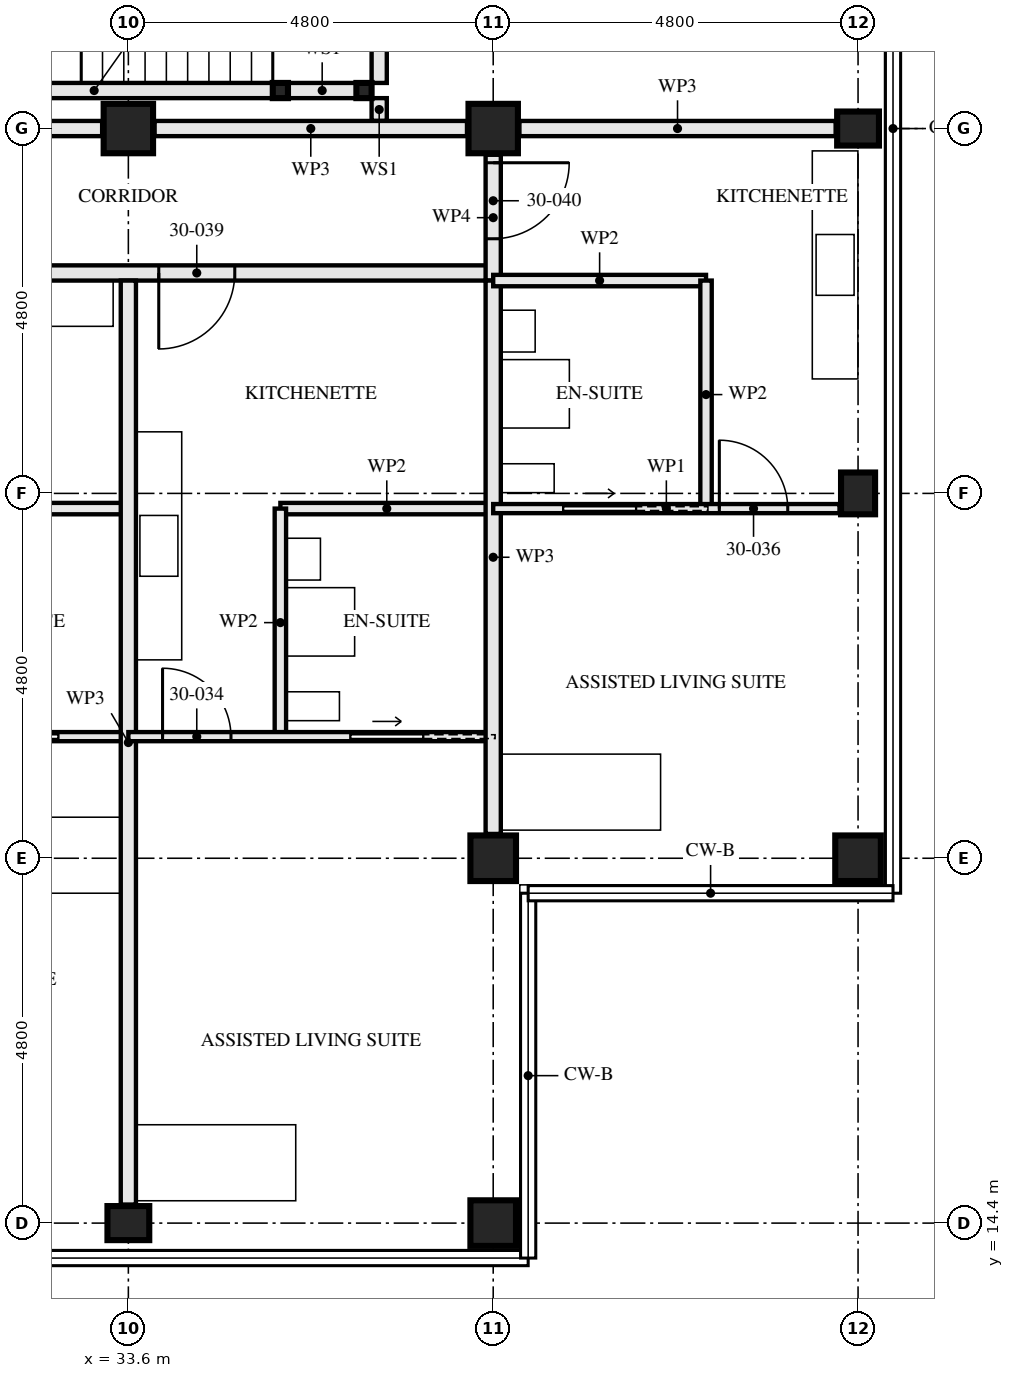
"""IFC4 building model, lengths in metres.
Left out: names, types, materials, properties, quantities, classifications, styles, units other than length and angle.
Written with IfcOpenShell. Run it as: python <this file> out.ifc"""

import sys

from ifc_helpers import new_model, si_unit, direction, frame, frame_2d, origin, origin_2d, place, context, subcontext, project, spatial, rectangle, hollow_rectangle, i_section, extrude, element, fill, save


model = new_model("IFC4")
c1 = context("Model", 3, precision=1e-05, world=origin(), true_north=direction((0.0, 1.0)))
c2 = subcontext(c1, "Body", "Model", "MODEL_VIEW")
j1 = project(units=[si_unit("LENGTHUNIT", "METRE"), si_unit("PLANEANGLEUNIT", "RADIAN")], contexts=[c1])
p1 = place(None, origin())
s1 = spatial("IfcSite", under=j1, at=p1, CompositionType="ELEMENT")
p2 = place(p1, origin())
s2 = spatial("IfcBuilding", under=s1, at=p2, CompositionType="ELEMENT")
p3 = place(p2, frame((0.0, 0.0, 112.0)))
s3 = spatial("IfcBuildingStorey", under=s2, at=p3, CompositionType="ELEMENT", Elevation=112.0)
p4 = place(p3, frame((33.6, 14.4, 0.0), z_axis=(0.0, 0.0, 1.0), x_axis=(0.0, 1.0, 0.0)))
e1 = element("IfcColumn", 1, at=p4, inside=s3, PredefinedType="COLUMN", context=c2, shape_type="SweptSolid", body=[
    extrude(i_section(OverallWidth=0.448, OverallDepth=0.55, WebThickness=0.072, FlangeThickness=0.115, FilletRadius=0.015, at=origin_2d()), origin(), (0.0, 0.0, 1.0), 3.5),
])
p5 = place(p3, frame((33.6, 28.8, 0.0), z_axis=(0.0, 0.0, 1.0), x_axis=(0.0, 1.0, 0.0)))
e2 = element("IfcColumn", 2, at=p5, inside=s3, PredefinedType="COLUMN", context=c2, shape_type="SweptSolid", body=[
    extrude(hollow_rectangle(XDim=0.65, YDim=0.65, WallThickness=0.05, at=origin_2d()), origin(), (0.0, 0.0, 1.0), 3.5),
])
for number, where, z_axis, x_axis in (
    (3, (38.4, 14.4, 0.0), (0.0, 0.0, 1.0), (0.0, 1.0, 0.0)),
    (4, (38.4, 19.2, 0.0), (0.0, 0.0, 1.0), (0.0, 1.0, 0.0)),
):
    element("IfcColumn", number, at=place(p3, frame(where, z_axis=z_axis, x_axis=x_axis)), inside=s3, PredefinedType="COLUMN", context=c2, shape_type="SweptSolid", body=[
        extrude(hollow_rectangle(XDim=0.6, YDim=0.6, WallThickness=0.05, at=origin_2d()), origin(), (0.0, 0.0, 1.0), 3.5),
    ])
p6 = place(p3, frame((38.4, 28.8, 0.0), z_axis=(0.0, 0.0, 1.0), x_axis=(0.0, 1.0, 0.0)))
e5 = element("IfcColumn", 5, at=p6, inside=s3, PredefinedType="COLUMN", context=c2, shape_type="SweptSolid", body=[
    extrude(hollow_rectangle(XDim=0.65, YDim=0.65, WallThickness=0.05, at=origin_2d()), origin(), (0.0, 0.0, 1.0), 3.5),
])
p7 = place(p3, frame((43.2, 19.2, 0.0), z_axis=(0.0, 0.0, 1.0), x_axis=(0.0, 1.0, 0.0)))
e6 = element("IfcColumn", 6, at=p7, inside=s3, PredefinedType="COLUMN", context=c2, shape_type="SweptSolid", body=[
    extrude(hollow_rectangle(XDim=0.6, YDim=0.6, WallThickness=0.05, at=origin_2d()), origin(), (0.0, 0.0, 1.0), 3.5),
])
for number, where, z_axis, x_axis in (
    (7, (43.2, 24.0, 0.0), (0.0, 0.0, 1.0), (1.0, 0.0, 0.0)),
    (8, (43.2, 28.8, 0.0), (0.0, 0.0, 1.0), (0.0, 1.0, 0.0)),
):
    element("IfcColumn", number, at=place(p3, frame(where, z_axis=z_axis, x_axis=x_axis)), inside=s3, PredefinedType="COLUMN", context=c2, shape_type="SweptSolid", body=[
        extrude(i_section(OverallWidth=0.448, OverallDepth=0.55, WebThickness=0.072, FlangeThickness=0.115, FilletRadius=0.015, at=origin_2d()), origin(), (0.0, 0.0, 1.0), 3.5),
    ])
for number, where, z_axis, x_axis in (
    (9, (36.7, 29.3, 0.0), (0.0, 0.0, 1.0), (1.0, 0.0, 0.0)),
    (10, (35.6, 29.3, 0.0), (0.0, 0.0, 1.0), (1.0, 0.0, 0.0)),
):
    element("IfcColumn", number, at=place(p3, frame(where, z_axis=z_axis, x_axis=x_axis)), inside=s3, PredefinedType="COLUMN", context=c2, shape_type="SweptSolid", body=[
        extrude(hollow_rectangle(XDim=0.2, YDim=0.2, WallThickness=0.008, at=origin_2d()), origin(), (0.0, 0.0, 1.0), 3.33),
    ])
p8 = place(p3, frame((30.8, 23.8, 0.0), z_axis=(0.0, 0.0, 1.0), x_axis=(1.0, 0.0, 0.0)))
e11 = element("IfcWall", 11, at=p8, inside=s3, PredefinedType="PARTITIONING", context=c2, shape_type="SweptSolid", body=[
    extrude(rectangle(XDim=2.8, YDim=0.15, at=frame_2d((1.4, 0.0))), origin(), (0.0, 0.0, 1.0), 3.33),
])
p9 = place(p3, frame((28.8, 20.8, 0.0), z_axis=(0.0, 0.0, 1.0), x_axis=(1.0, 0.0, 0.0)))
e12 = element("IfcWall", 12, at=p9, inside=s3, PredefinedType="PARTITIONING", context=c2, shape_type="SweptSolid", body=[
    extrude(rectangle(XDim=4.8, YDim=0.12, at=frame_2d((2.4, 0.0))), origin(), (0.0, 0.0, 1.0), 3.33),
])
p10 = place(p9, frame((0.45, 0.0, 0.0)))
e13 = element("IfcOpeningElement", 13, at=p10, cuts=e12, PredefinedType="OPENING", context=c2, shape_type="SweptSolid", body=[
    extrude(rectangle(XDim=0.9, YDim=2.1, at=frame_2d((0.45, 1.05))), frame((0.0, 0.071, 0.0), z_axis=(0.0, -1.0, 0.0), x_axis=(1.0, 0.0, 0.0)), (0.0, 0.0, 1.0), 0.141),
])
p11 = place(p9, frame((2.925, 0.0, 0.0)))
e14 = element("IfcOpeningElement", 14, at=p11, cuts=e12, PredefinedType="OPENING", context=c2, shape_type="SweptSolid", body=[
    extrude(rectangle(XDim=0.95, YDim=2.1, at=frame_2d((0.475, 1.05))), frame((0.0, 0.071, 0.0), z_axis=(0.0, -1.0, 0.0), x_axis=(1.0, 0.0, 0.0)), (0.0, 0.0, 1.0), 0.141),
])
p12 = place(p3, frame((33.6, 14.644, 0.0), z_axis=(0.0, 0.0, 1.0), x_axis=(0.0, 1.0, 0.0)))
e15 = element("IfcWall", 15, at=p12, inside=s3, PredefinedType="PARTITIONING", context=c2, shape_type="SweptSolid", body=[
    extrude(rectangle(XDim=12.156, YDim=0.2, at=frame_2d((6.078, 0.0))), origin(), (0.0, 0.0, 1.0), 2.55),
])
p13 = place(p3, frame((35.6, 20.8, 0.0), z_axis=(0.0, 0.0, 1.0), x_axis=(0.0, 1.0, 0.0)))
e16 = element("IfcWall", 16, at=p13, inside=s3, PredefinedType="PARTITIONING", context=c2, shape_type="SweptSolid", body=[
    extrude(rectangle(XDim=3.0, YDim=0.15, at=frame_2d((1.5, 0.0))), origin(), (0.0, 0.0, 1.0), 3.33),
])
p14 = place(p3, frame((35.6, 23.8, 0.0), z_axis=(0.0, 0.0, 1.0), x_axis=(1.0, 0.0, 0.0)))
e17 = element("IfcWall", 17, at=p14, inside=s3, PredefinedType="PARTITIONING", context=c2, shape_type="SweptSolid", body=[
    extrude(rectangle(XDim=2.8, YDim=0.15, at=frame_2d((1.4, 0.0))), origin(), (0.0, 0.0, 1.0), 3.33),
])
p15 = place(p3, frame((33.6, 20.8, 0.0), z_axis=(0.0, 0.0, 1.0), x_axis=(1.0, 0.0, 0.0)))
e18 = element("IfcWall", 18, at=p15, inside=s3, PredefinedType="PARTITIONING", context=c2, shape_type="SweptSolid", body=[
    extrude(rectangle(XDim=4.8, YDim=0.12, at=frame_2d((2.4, 0.0))), origin(), (0.0, 0.0, 1.0), 3.33),
])
p16 = place(p15, frame((0.45, 0.0, 0.0)))
e19 = element("IfcOpeningElement", 19, at=p16, cuts=e18, PredefinedType="OPENING", context=c2, shape_type="SweptSolid", body=[
    extrude(rectangle(XDim=0.9, YDim=2.1, at=frame_2d((0.45, 1.05))), frame((0.0, 0.071, 0.0), z_axis=(0.0, -1.0, 0.0), x_axis=(1.0, 0.0, 0.0)), (0.0, 0.0, 1.0), 0.141),
])
p17 = place(p15, frame((2.925, 0.0, 0.0)))
e20 = element("IfcOpeningElement", 20, at=p17, cuts=e18, PredefinedType="OPENING", context=c2, shape_type="SweptSolid", body=[
    extrude(rectangle(XDim=0.95, YDim=2.1, at=frame_2d((0.475, 1.05))), frame((0.0, 0.071, 0.0), z_axis=(0.0, -1.0, 0.0), x_axis=(1.0, 0.0, 0.0)), (0.0, 0.0, 1.0), 0.141),
])
p18 = place(p3, frame((38.4, 19.52, 0.0), z_axis=(0.0, 0.0, 1.0), x_axis=(0.0, 1.0, 0.0)))
e21 = element("IfcWall", 21, at=p18, inside=s3, PredefinedType="PARTITIONING", context=c2, shape_type="SweptSolid", body=[
    extrude(rectangle(XDim=7.28, YDim=0.2, at=frame_2d((3.64, 0.0))), origin(), (0.0, 0.0, 1.0), 2.55),
])
p19 = place(p3, frame((41.2, 23.8, 0.0), z_axis=(0.0, 0.0, 1.0), x_axis=(0.0, 1.0, 0.0)))
e22 = element("IfcWall", 22, at=p19, inside=s3, PredefinedType="PARTITIONING", context=c2, shape_type="SweptSolid", body=[
    extrude(rectangle(XDim=3.0, YDim=0.15, at=frame_2d((1.5, 0.0))), origin(), (0.0, 0.0, 1.0), 2.55),
])
p20 = place(p3, frame((38.4, 26.8, 0.0), z_axis=(0.0, 0.0, 1.0), x_axis=(1.0, 0.0, 0.0)))
e23 = element("IfcWall", 23, at=p20, inside=s3, PredefinedType="PARTITIONING", context=c2, shape_type="SweptSolid", body=[
    extrude(rectangle(XDim=2.8, YDim=0.15, at=frame_2d((1.4, 0.0))), origin(), (0.0, 0.0, 1.0), 3.33),
])
p21 = place(p3, frame((38.4, 23.8, 0.0), z_axis=(0.0, 0.0, 1.0), x_axis=(1.0, 0.0, 0.0)))
e24 = element("IfcWall", 24, at=p21, inside=s3, PredefinedType="PARTITIONING", context=c2, shape_type="SweptSolid", body=[
    extrude(rectangle(XDim=4.556, YDim=0.12, at=frame_2d((2.278, 0.0))), origin(), (0.0, 0.0, 1.0), 3.33),
])
p22 = place(p21, frame((2.975, 0.0, 0.0)))
e25 = element("IfcOpeningElement", 25, at=p22, cuts=e24, PredefinedType="OPENING", context=c2, shape_type="SweptSolid", body=[
    extrude(rectangle(XDim=0.9, YDim=2.1, at=frame_2d((0.45, 1.05))), frame((0.0, 0.071, 0.0), z_axis=(0.0, -1.0, 0.0), x_axis=(1.0, 0.0, 0.0)), (0.0, 0.0, 1.0), 0.141),
])
p23 = place(p21, frame((0.925, 0.0, 0.0)))
e26 = element("IfcOpeningElement", 26, at=p23, cuts=e24, PredefinedType="OPENING", context=c2, shape_type="SweptSolid", body=[
    extrude(rectangle(XDim=0.95, YDim=2.1, at=frame_2d((0.475, 1.05))), frame((0.0, 0.071, 0.0), z_axis=(0.0, -1.0, 0.0), x_axis=(1.0, 0.0, 0.0)), (0.0, 0.0, 1.0), 0.141),
])
p24 = place(p3, frame((28.8, 26.9, 0.0), z_axis=(0.0, 0.0, 1.0), x_axis=(1.0, 0.0, 0.0)))
e27 = element("IfcWall", 27, at=p24, inside=s3, PredefinedType="PARTITIONING", context=c2, shape_type="SweptSolid", body=[
    extrude(rectangle(XDim=9.6, YDim=0.2, at=frame_2d((4.8, 0.0))), origin(), (0.0, 0.0, 1.0), 3.33),
])
p25 = place(p24, frame((0.4, 0.0, 0.0)))
e28 = element("IfcOpeningElement", 28, at=p25, cuts=e27, PredefinedType="OPENING", context=c2, shape_type="SweptSolid", body=[
    extrude(rectangle(XDim=1.0, YDim=2.1, at=frame_2d((0.5, 1.05))), frame((0.0, 0.111, 0.0), z_axis=(0.0, -1.0, 0.0), x_axis=(1.0, 0.0, 0.0)), (0.0, 0.0, 1.0), 0.221),
])
p26 = place(p24, frame((5.2, 0.0, 0.0)))
e29 = element("IfcOpeningElement", 29, at=p26, cuts=e27, PredefinedType="OPENING", context=c2, shape_type="SweptSolid", body=[
    extrude(rectangle(XDim=1.0, YDim=2.1, at=frame_2d((0.5, 1.05))), frame((0.0, 0.111, 0.0), z_axis=(0.0, -1.0, 0.0), x_axis=(1.0, 0.0, 0.0)), (0.0, 0.0, 1.0), 0.221),
])
p27 = place(p3, frame((38.4, 26.8, 0.0), z_axis=(0.0, 0.0, 1.0), x_axis=(0.0, 1.0, 0.0)))
e30 = element("IfcWall", 30, at=p27, inside=s3, PredefinedType="PARTITIONING", context=c2, shape_type="SweptSolid", body=[
    extrude(rectangle(XDim=1.655, YDim=0.2, at=frame_2d((0.828, 0.0))), origin(), (0.0, 0.0, 1.0), 3.33),
])
p28 = place(p27, frame((0.55, 0.0, 0.0)))
e31 = element("IfcOpeningElement", 31, at=p28, cuts=e30, PredefinedType="OPENING", context=c2, shape_type="SweptSolid", body=[
    extrude(rectangle(XDim=1.0, YDim=2.1, at=frame_2d((0.5, 1.05))), frame((0.0, 0.111, 0.0), z_axis=(0.0, -1.0, 0.0), x_axis=(1.0, 0.0, 0.0)), (0.0, 0.0, 1.0), 0.221),
])
p29 = place(p3, frame((36.6, 29.3, 0.0), z_axis=(0.0, 0.0, 1.0), x_axis=(-1.0, 0.0, 0.0)))
e32 = element("IfcWall", 32, at=p29, inside=s3, PredefinedType="SOLIDWALL", context=c2, shape_type="SweptSolid", body=[
    extrude(rectangle(XDim=0.9, YDim=0.2, at=frame_2d((0.45, 0.0))), origin(), (0.0, 0.0, 1.0), 2.99),
])
p30 = place(p3, frame((35.5, 29.3, 0.0), z_axis=(0.0, 0.0, 1.0), x_axis=(-1.0, 0.0, 0.0)))
e33 = element("IfcWall", 33, at=p30, inside=s3, PredefinedType="SOLIDWALL", context=c2, shape_type="SweptSolid", body=[
    extrude(rectangle(XDim=4.7, YDim=0.2, at=frame_2d((2.35, 0.0))), origin(), (0.0, 0.0, 1.0), 2.99),
])
p31 = place(p3, frame((36.9, 28.9, 0.0), z_axis=(0.0, 0.0, 1.0), x_axis=(0.0, 1.0, 0.0)))
e34 = element("IfcWall", 34, at=p31, inside=s3, PredefinedType="SOLIDWALL", context=c2, shape_type="SweptSolid", body=[
    extrude(rectangle(XDim=0.3, YDim=0.2, at=frame_2d((0.15, 0.0))), origin(), (0.0, 0.0, 1.0), 3.33),
])
p32 = place(p3, frame((36.9, 29.4, 0.0), z_axis=(0.0, 0.0, 1.0), x_axis=(0.0, 1.0, 0.0)))
e35 = element("IfcWall", 35, at=p32, inside=s3, PredefinedType="SOLIDWALL", context=c2, shape_type="SweptSolid", body=[
    extrude(rectangle(XDim=2.6, YDim=0.2, at=frame_2d((1.3, 0.0))), origin(), (0.0, 0.0, 1.0), 3.33),
])
p33 = place(p3, frame((42.905, 28.8, 0.0), z_axis=(0.0, 0.0, 1.0), x_axis=(-1.0, 0.0, 0.0)))
e36 = element("IfcWall", 36, at=p33, inside=s3, PredefinedType="PARTITIONING", context=c2, shape_type="SweptSolid", body=[
    extrude(rectangle(XDim=4.16, YDim=0.2, at=frame_2d((2.08, 0.0))), origin(), (0.0, 0.0, 1.0), 2.32),
])
p34 = place(p3, frame((38.055, 28.8, 0.0), z_axis=(0.0, 0.0, 1.0), x_axis=(-1.0, 0.0, 0.0)))
e37 = element("IfcWall", 37, at=p34, inside=s3, PredefinedType="PARTITIONING", context=c2, shape_type="SweptSolid", body=[
    extrude(rectangle(XDim=4.11, YDim=0.2, at=frame_2d((2.055, 0.0))), origin(), (0.0, 0.0, 1.0), 2.32),
])
p35 = place(p3, frame((33.255, 28.8, 0.0), z_axis=(0.0, 0.0, 1.0), x_axis=(-1.0, 0.0, 0.0)))
e38 = element("IfcWall", 38, at=p35, inside=s3, PredefinedType="PARTITIONING", context=c2, shape_type="SweptSolid", body=[
    extrude(rectangle(XDim=2.555, YDim=0.2, at=frame_2d((1.277, 0.0))), origin(), (0.0, 0.0, 1.0), 2.32),
])
p36 = place(p11, origin())
e39 = element("IfcDoor", 39, at=p36, inside=s3, OperationType="SLIDING_TO_RIGHT", PredefinedType="DOOR", context=c2, shape_type="SweptSolid", body=[
    extrude(rectangle(XDim=0.95, YDim=2.1, at=frame_2d((0.475, 1.05))), frame((0.0, 0.022, 0.0), z_axis=(0.0, -1.0, 0.0), x_axis=(1.0, 0.0, 0.0)), (0.0, 0.0, 1.0), 0.044),
])
fill(e14, e39)
p37 = place(p16, origin())
e40 = element("IfcDoor", 40, at=p37, inside=s3, OperationType="SINGLE_SWING_RIGHT", PredefinedType="DOOR", context=c2, shape_type="SweptSolid", body=[
    extrude(rectangle(XDim=0.9, YDim=2.1, at=frame_2d((0.45, 1.05))), frame((0.0, 0.022, 0.0), z_axis=(0.0, -1.0, 0.0), x_axis=(1.0, 0.0, 0.0)), (0.0, 0.0, 1.0), 0.044),
])
fill(e19, e40)
p38 = place(p17, origin())
e41 = element("IfcDoor", 41, at=p38, inside=s3, OperationType="SLIDING_TO_LEFT", PredefinedType="DOOR", context=c2, shape_type="SweptSolid", body=[
    extrude(rectangle(XDim=0.95, YDim=2.1, at=frame_2d((0.475, 1.05))), frame((0.0, 0.022, 0.0), z_axis=(0.0, -1.0, 0.0), x_axis=(1.0, 0.0, 0.0)), (0.0, 0.0, 1.0), 0.044),
])
fill(e20, e41)
p39 = place(p22, origin())
e42 = element("IfcDoor", 42, at=p39, inside=s3, OperationType="SINGLE_SWING_RIGHT", PredefinedType="DOOR", context=c2, shape_type="SweptSolid", body=[
    extrude(rectangle(XDim=0.9, YDim=2.1, at=frame_2d((0.45, 1.05))), frame((0.0, 0.022, 0.0), z_axis=(0.0, -1.0, 0.0), x_axis=(1.0, 0.0, 0.0)), (0.0, 0.0, 1.0), 0.044),
])
fill(e25, e42)
p40 = place(p23, origin())
e43 = element("IfcDoor", 43, at=p40, inside=s3, OperationType="SLIDING_TO_LEFT", PredefinedType="DOOR", context=c2, shape_type="SweptSolid", body=[
    extrude(rectangle(XDim=0.95, YDim=2.1, at=frame_2d((0.475, 1.05))), frame((0.0, 0.022, 0.0), z_axis=(0.0, -1.0, 0.0), x_axis=(1.0, 0.0, 0.0)), (0.0, 0.0, 1.0), 0.044),
])
fill(e26, e43)
p41 = place(p26, frame((1.0, 0.0, 0.0), z_axis=(0.0, 0.0, 1.0), x_axis=(-1.0, 0.0, 0.0)))
e44 = element("IfcDoor", 44, at=p41, inside=s3, OperationType="SINGLE_SWING_LEFT", PredefinedType="DOOR", context=c2, shape_type="SweptSolid", body=[
    extrude(rectangle(XDim=1.0, YDim=2.1, at=frame_2d((0.5, 1.05))), frame((0.0, 0.027, 0.0), z_axis=(0.0, -1.0, 0.0), x_axis=(1.0, 0.0, 0.0)), (0.0, 0.0, 1.0), 0.054),
])
fill(e29, e44)
p42 = place(p28, frame((1.0, 0.0, 0.0), z_axis=(0.0, 0.0, 1.0), x_axis=(-1.0, 0.0, 0.0)))
e45 = element("IfcDoor", 45, at=p42, inside=s3, OperationType="SINGLE_SWING_RIGHT", PredefinedType="DOOR", context=c2, shape_type="SweptSolid", body=[
    extrude(rectangle(XDim=1.0, YDim=2.1, at=frame_2d((0.5, 1.05))), frame((0.0, 0.027, 0.0), z_axis=(0.0, -1.0, 0.0), x_axis=(1.0, 0.0, 0.0)), (0.0, 0.0, 1.0), 0.054),
])
fill(e31, e45)
save(model, sys.argv[1])
